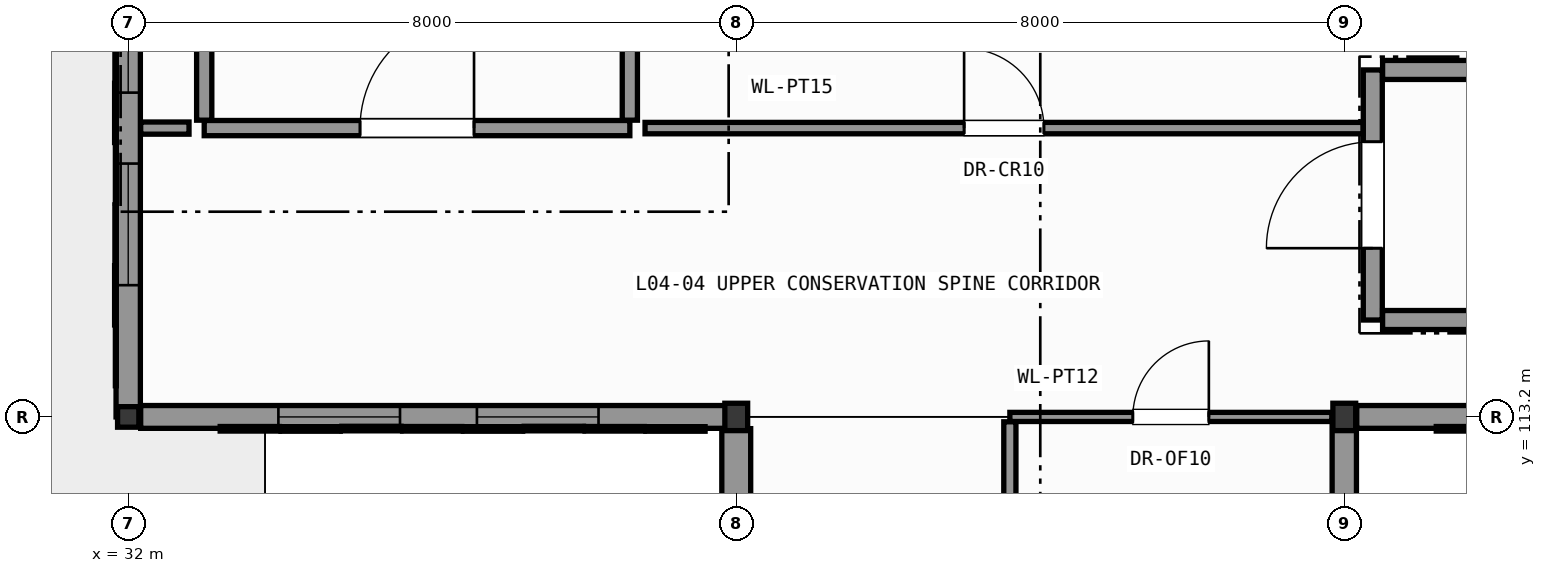
"""IFC4 building model, lengths in metres.
Left out: names, types, materials, properties, quantities, classifications, styles, units other than length and angle.
Written with IfcOpenShell. Run it as: python <this file> out.ifc"""

import sys

from ifc_helpers import new_model, si_unit, direction, frame, frame_2d, origin, origin_2d, place, context, subcontext, project, spatial, rectangle, i_section, extrude, element, fill, save


model = new_model("IFC4")
c1 = context("Model", 3, precision=1e-05, world=origin(), true_north=direction((0.0, 1.0)))
c2 = subcontext(c1, "Body", "Model", "MODEL_VIEW")
j1 = project(units=[si_unit("LENGTHUNIT", "METRE"), si_unit("PLANEANGLEUNIT", "RADIAN")], contexts=[c1])
p1 = place(None, origin())
s1 = spatial("IfcSite", under=j1, at=p1, CompositionType="ELEMENT")
p2 = place(p1, origin())
s2 = spatial("IfcBuilding", under=s1, at=p2, CompositionType="ELEMENT")
p3 = place(p2, frame((0.0, 0.0, 18.0)))
s3 = spatial("IfcBuildingStorey", under=s2, at=p3, CompositionType="ELEMENT", Elevation=18.0)
p4 = place(p3, frame((32.0, 113.2, 0.0), z_axis=(0.0, 0.0, 1.0), x_axis=(1.0, 0.0, 0.0)))
e1 = element("IfcColumn", 1, at=p4, inside=s3, PredefinedType="COLUMN", context=c2, shape_type="SweptSolid", body=[
    extrude(i_section(OverallWidth=0.28, OverallDepth=0.27, WebThickness=0.008, FlangeThickness=0.013, FilletRadius=0.024, at=origin_2d()), origin(), (0.0, 0.0, 1.0), 4.2),
])
for number, where, z_axis, x_axis in (
    (2, (40.0, 113.2, 0.0), (0.0, 0.0, 1.0), (1.0, 0.0, 0.0)),
    (3, (48.0, 113.2, 0.0), (0.0, 0.0, 1.0), (1.0, 0.0, 0.0)),
):
    element("IfcColumn", number, at=place(p3, frame(where, z_axis=z_axis, x_axis=x_axis)), inside=s3, PredefinedType="COLUMN", context=c2, shape_type="SweptSolid", body=[
        extrude(i_section(OverallWidth=0.3, OverallDepth=0.36, WebThickness=0.012, FlangeThickness=0.022, FilletRadius=0.027, at=origin_2d()), origin(), (0.0, 0.0, 1.0), 4.2),
    ])
p5 = place(p3, frame((48.0, 113.2, 0.0), z_axis=(0.0, 0.0, 1.0), x_axis=(0.0, -1.0, 0.0)))
e4 = element("IfcWall", 4, at=p5, inside=s3, PredefinedType="SOLIDWALL", context=c2, shape_type="SweptSolid", body=[
    extrude(rectangle(XDim=7.6, YDim=0.32, at=frame_2d((3.8, 0.0))), origin(), (0.0, 0.0, 1.0), 3.485),
])
p6 = place(p5, frame((1.958, 0.0, 0.95)))
e5 = element("IfcOpeningElement", 5, at=p6, cuts=e4, PredefinedType="OPENING", context=c2, shape_type="SweptSolid", body=[
    extrude(rectangle(XDim=1.15, YDim=1.9, at=frame_2d((0.575, 0.95))), frame((0.0, 0.17, 0.0), z_axis=(0.0, -1.0, 0.0), x_axis=(1.0, 0.0, 0.0)), (0.0, 0.0, 1.0), 0.34),
])
p7 = place(p5, frame((4.492, 0.0, 0.95)))
e6 = element("IfcOpeningElement", 6, at=p7, cuts=e4, PredefinedType="OPENING", context=c2, shape_type="SweptSolid", body=[
    extrude(rectangle(XDim=1.15, YDim=1.9, at=frame_2d((0.575, 0.95))), frame((0.0, 0.17, 0.0), z_axis=(0.0, -1.0, 0.0), x_axis=(1.0, 0.0, 0.0)), (0.0, 0.0, 1.0), 0.34),
])
p8 = place(p3, frame((56.0, 113.2, 0.0), z_axis=(0.0, 0.0, 1.0), x_axis=(-1.0, 0.0, 0.0)))
e7 = element("IfcWall", 7, at=p8, inside=s3, PredefinedType="SOLIDWALL", context=c2, shape_type="SweptSolid", body=[
    extrude(rectangle(XDim=7.836, YDim=0.3, at=frame_2d((3.918, 0.0))), origin(), (0.0, 0.0, 1.0), 3.625),
])
p9 = place(p8, frame((1.812, 0.0, 0.95)))
e8 = element("IfcOpeningElement", 8, at=p9, cuts=e7, PredefinedType="OPENING", context=c2, shape_type="SweptSolid", body=[
    extrude(rectangle(XDim=1.6, YDim=2.2, at=frame_2d((0.8, 1.1))), frame((0.0, 0.16, 0.0), z_axis=(0.0, -1.0, 0.0), x_axis=(1.0, 0.0, 0.0)), (0.0, 0.0, 1.0), 0.32),
])
p10 = place(p8, frame((4.424, 0.0, 0.95)))
e9 = element("IfcOpeningElement", 9, at=p10, cuts=e7, PredefinedType="OPENING", context=c2, shape_type="SweptSolid", body=[
    extrude(rectangle(XDim=1.6, YDim=2.2, at=frame_2d((0.8, 1.1))), frame((0.0, 0.16, 0.0), z_axis=(0.0, -1.0, 0.0), x_axis=(1.0, 0.0, 0.0)), (0.0, 0.0, 1.0), 0.32),
])
p11 = place(p3, frame((32.0, 113.2, 0.0), z_axis=(0.0, 0.0, 1.0), x_axis=(0.0, 1.0, 0.0)))
e10 = element("IfcWall", 10, at=p11, inside=s3, PredefinedType="SOLIDWALL", context=c2, shape_type="SweptSolid", body=[
    extrude(rectangle(XDim=7.6, YDim=0.32, at=frame_2d((3.8, 0.0))), origin(), (0.0, 0.0, 1.0), 3.485),
])
p12 = place(p11, frame((1.733, 0.0, 0.95)))
e11 = element("IfcOpeningElement", 11, at=p12, cuts=e10, PredefinedType="OPENING", context=c2, shape_type="SweptSolid", body=[
    extrude(rectangle(XDim=1.6, YDim=2.13, at=frame_2d((0.8, 1.065))), frame((0.0, 0.17, 0.0), z_axis=(0.0, -1.0, 0.0), x_axis=(1.0, 0.0, 0.0)), (0.0, 0.0, 1.0), 0.34),
])
p13 = place(p11, frame((4.267, 0.0, 0.95)))
e12 = element("IfcOpeningElement", 12, at=p13, cuts=e10, PredefinedType="OPENING", context=c2, shape_type="SweptSolid", body=[
    extrude(rectangle(XDim=1.6, YDim=2.13, at=frame_2d((0.8, 1.065))), frame((0.0, 0.17, 0.0), z_axis=(0.0, -1.0, 0.0), x_axis=(1.0, 0.0, 0.0)), (0.0, 0.0, 1.0), 0.34),
])
p14 = place(p3, frame((40.0, 113.2, 0.0), z_axis=(0.0, 0.0, 1.0), x_axis=(-1.0, 0.0, 0.0)))
e13 = element("IfcWall", 13, at=p14, inside=s3, PredefinedType="SOLIDWALL", context=c2, shape_type="SweptSolid", body=[
    extrude(rectangle(XDim=7.836, YDim=0.3, at=frame_2d((3.918, 0.0))), origin(), (0.0, 0.0, 1.0), 3.755),
])
p15 = place(p14, frame((1.812, 0.0, 0.95)))
e14 = element("IfcOpeningElement", 14, at=p15, cuts=e13, PredefinedType="OPENING", context=c2, shape_type="SweptSolid", body=[
    extrude(rectangle(XDim=1.6, YDim=2.2, at=frame_2d((0.8, 1.1))), frame((0.0, 0.16, 0.0), z_axis=(0.0, -1.0, 0.0), x_axis=(1.0, 0.0, 0.0)), (0.0, 0.0, 1.0), 0.32),
])
p16 = place(p14, frame((4.424, 0.0, 0.95)))
e15 = element("IfcOpeningElement", 15, at=p16, cuts=e13, PredefinedType="OPENING", context=c2, shape_type="SweptSolid", body=[
    extrude(rectangle(XDim=1.6, YDim=2.2, at=frame_2d((0.8, 1.1))), frame((0.0, 0.16, 0.0), z_axis=(0.0, -1.0, 0.0), x_axis=(1.0, 0.0, 0.0)), (0.0, 0.0, 1.0), 0.32),
])
p17 = place(p3, frame((40.0, 105.6, 0.0), z_axis=(0.0, 0.0, 1.0), x_axis=(0.0, 1.0, 0.0)))
e16 = element("IfcWall", 16, at=p17, inside=s3, PredefinedType="SOLIDWALL", context=c2, shape_type="SweptSolid", body=[
    extrude(rectangle(XDim=7.446, YDim=0.38, at=frame_2d((3.723, 0.0))), origin(), (0.0, 0.0, 1.0), 3.98),
])
p18 = place(p17, frame((1.632, 0.0, 0.95)))
e17 = element("IfcOpeningElement", 17, at=p18, cuts=e16, PredefinedType="OPENING", context=c2, shape_type="SweptSolid", body=[
    extrude(rectangle(XDim=1.7, YDim=2.63, at=frame_2d((0.85, 1.315))), frame((0.0, 0.2, 0.0), z_axis=(0.0, -1.0, 0.0), x_axis=(1.0, 0.0, 0.0)), (0.0, 0.0, 1.0), 0.4),
])
p19 = place(p17, frame((4.114, 0.0, 0.95)))
e18 = element("IfcOpeningElement", 18, at=p19, cuts=e16, PredefinedType="OPENING", context=c2, shape_type="SweptSolid", body=[
    extrude(rectangle(XDim=1.7, YDim=2.63, at=frame_2d((0.85, 1.315))), frame((0.0, 0.2, 0.0), z_axis=(0.0, -1.0, 0.0), x_axis=(1.0, 0.0, 0.0)), (0.0, 0.0, 1.0), 0.4),
])
p20 = place(p3, frame((48.375, 114.475, 0.0), z_axis=(0.0, 0.0, 1.0), x_axis=(0.0, 1.0, 0.0)))
e19 = element("IfcWall", 19, at=p20, inside=s3, PredefinedType="SHEAR", context=c2, shape_type="SweptSolid", body=[
    extrude(rectangle(XDim=3.29, YDim=0.25, at=frame_2d((1.645, 0.0))), origin(), (0.0, 0.0, 1.0), 3.98),
])
p21 = place(p20, frame((0.945, 0.0, 0.0)))
e20 = element("IfcOpeningElement", 20, at=p21, cuts=e19, PredefinedType="OPENING", context=c2, shape_type="SweptSolid", body=[
    extrude(rectangle(XDim=1.4, YDim=2.2, at=frame_2d((0.7, 1.1))), frame((0.0, 0.135, 0.0), z_axis=(0.0, -1.0, 0.0), x_axis=(1.0, 0.0, 0.0)), (0.0, 0.0, 1.0), 0.27),
])
for number, where, z_axis, x_axis in (
    (21, (48.504, 114.475, 0.0), (0.0, 0.0, 1.0), (1.0, 0.0, 0.0)),
    (22, (48.504, 117.765, 0.0), (0.0, 0.0, 1.0), (1.0, 0.0, 0.0)),
):
    element("IfcWall", number, at=place(p3, frame(where, z_axis=z_axis, x_axis=x_axis)), inside=s3, PredefinedType="SHEAR", context=c2, shape_type="SweptSolid", body=[
        extrude(rectangle(XDim=6.892, YDim=0.25, at=frame_2d((3.446, 0.0))), origin(), (0.0, 0.0, 1.0), 3.98),
    ])
p22 = place(p3, frame((33.0, 117.0, 0.0), z_axis=(0.0, 0.0, 1.0), x_axis=(1.0, 0.0, 0.0)))
e23 = element("IfcWall", 23, at=p22, inside=s3, PredefinedType="PARTITIONING", context=c2, shape_type="SweptSolid", body=[
    extrude(rectangle(XDim=5.6, YDim=0.2, at=frame_2d((2.8, 0.0))), origin(), (0.0, 0.0, 1.0), 3.98),
])
p23 = place(p22, frame((2.05, 0.0, 0.0)))
e24 = element("IfcOpeningElement", 24, at=p23, cuts=e23, PredefinedType="OPENING", context=c2, shape_type="SweptSolid", body=[
    extrude(rectangle(XDim=1.5, YDim=2.2, at=frame_2d((0.75, 1.1))), frame((0.0, 0.11, 0.0), z_axis=(0.0, -1.0, 0.0), x_axis=(1.0, 0.0, 0.0)), (0.0, 0.0, 1.0), 0.22),
])
for number, where, z_axis, x_axis in (
    (25, (33.0, 117.104, 0.0), (0.0, 0.0, 1.0), (0.0, 1.0, 0.0)),
    (26, (38.6, 117.104, 0.0), (0.0, 0.0, 1.0), (0.0, 1.0, 0.0)),
):
    element("IfcWall", number, at=place(p3, frame(where, z_axis=z_axis, x_axis=x_axis)), inside=s3, PredefinedType="PARTITIONING", context=c2, shape_type="SweptSolid", body=[
        extrude(rectangle(XDim=5.096, YDim=0.2, at=frame_2d((2.548, 0.0))), origin(), (0.0, 0.0, 1.0), 3.98),
    ])
p24 = place(p3, frame((32.164, 117.0, 0.0), z_axis=(0.0, 0.0, 1.0), x_axis=(1.0, 0.0, 0.0)))
e27 = element("IfcWall", 27, at=p24, inside=s3, PredefinedType="PARTITIONING", context=c2, shape_type="SweptSolid", body=[
    extrude(rectangle(XDim=0.636, YDim=0.16, at=frame_2d((0.318, 0.0))), origin(), (0.0, 0.0, 1.0), 3.98),
])
p25 = place(p3, frame((38.8, 117.0, 0.0), z_axis=(0.0, 0.0, 1.0), x_axis=(1.0, 0.0, 0.0)))
e28 = element("IfcWall", 28, at=p25, inside=s3, PredefinedType="PARTITIONING", context=c2, shape_type="SweptSolid", body=[
    extrude(rectangle(XDim=9.446, YDim=0.15, at=frame_2d((4.723, 0.0))), origin(), (0.0, 0.0, 1.0), 3.98),
])
p26 = place(p25, frame((4.198, 0.0, 0.0)))
e29 = element("IfcOpeningElement", 29, at=p26, cuts=e28, PredefinedType="OPENING", context=c2, shape_type="SweptSolid", body=[
    extrude(rectangle(XDim=1.05, YDim=2.2, at=frame_2d((0.525, 1.1))), frame((0.0, 0.085, 0.0), z_axis=(0.0, -1.0, 0.0), x_axis=(1.0, 0.0, 0.0)), (0.0, 0.0, 1.0), 0.17),
])
p27 = place(p3, frame((43.6, 113.2, 0.0), z_axis=(0.0, 0.0, 1.0), x_axis=(1.0, 0.0, 0.0)))
e30 = element("IfcWall", 30, at=p27, inside=s3, PredefinedType="PARTITIONING", context=c2, shape_type="SweptSolid", body=[
    extrude(rectangle(XDim=4.236, YDim=0.12, at=frame_2d((2.118, 0.0))), origin(), (0.0, 0.0, 1.0), 3.685),
])
p28 = place(p27, frame((1.618, 0.0, 0.0)))
e31 = element("IfcOpeningElement", 31, at=p28, cuts=e30, PredefinedType="OPENING", context=c2, shape_type="SweptSolid", body=[
    extrude(rectangle(XDim=1.0, YDim=2.15, at=frame_2d((0.5, 1.075))), frame((0.0, 0.07, 0.0), z_axis=(0.0, -1.0, 0.0), x_axis=(1.0, 0.0, 0.0)), (0.0, 0.0, 1.0), 0.14),
])
p29 = place(p3, frame((43.6, 83.4, 0.0), z_axis=(0.0, 0.0, 1.0), x_axis=(0.0, 1.0, 0.0)))
e32 = element("IfcWall", 32, at=p29, inside=s3, PredefinedType="PARTITIONING", context=c2, shape_type="SweptSolid", body=[
    extrude(rectangle(XDim=29.736, YDim=0.16, at=frame_2d((14.868, 0.0))), origin(), (0.0, 0.0, 1.0), 3.98),
])
p30 = place(p29, frame((14.393, 0.0, 0.0)))
e33 = element("IfcOpeningElement", 33, at=p30, cuts=e32, PredefinedType="OPENING", context=c2, shape_type="SweptSolid", body=[
    extrude(rectangle(XDim=0.95, YDim=2.1, at=frame_2d((0.475, 1.05))), frame((0.0, 0.09, 0.0), z_axis=(0.0, -1.0, 0.0), x_axis=(1.0, 0.0, 0.0)), (0.0, 0.0, 1.0), 0.18),
])
p31 = place(p12, origin())
e34 = element("IfcWindow", 34, at=p31, inside=s3, PartitioningType="SINGLE_PANEL", PredefinedType="WINDOW", context=c2, shape_type="SweptSolid", body=[
    extrude(rectangle(XDim=1.6, YDim=2.13, at=frame_2d((0.8, 1.065))), frame((0.0, 0.03, 0.0), z_axis=(0.0, -1.0, 0.0), x_axis=(1.0, 0.0, 0.0)), (0.0, 0.0, 1.0), 0.06),
])
fill(e11, e34)
p32 = place(p13, origin())
e35 = element("IfcWindow", 35, at=p32, inside=s3, PartitioningType="SINGLE_PANEL", PredefinedType="WINDOW", context=c2, shape_type="SweptSolid", body=[
    extrude(rectangle(XDim=1.6, YDim=2.13, at=frame_2d((0.8, 1.065))), frame((0.0, 0.03, 0.0), z_axis=(0.0, -1.0, 0.0), x_axis=(1.0, 0.0, 0.0)), (0.0, 0.0, 1.0), 0.06),
])
fill(e12, e35)
p33 = place(p15, origin())
e36 = element("IfcWindow", 36, at=p33, inside=s3, PartitioningType="SINGLE_PANEL", PredefinedType="WINDOW", context=c2, shape_type="SweptSolid", body=[
    extrude(rectangle(XDim=1.6, YDim=2.2, at=frame_2d((0.8, 1.1))), frame((0.0, 0.03, 0.0), z_axis=(0.0, -1.0, 0.0), x_axis=(1.0, 0.0, 0.0)), (0.0, 0.0, 1.0), 0.06),
])
fill(e14, e36)
p34 = place(p16, origin())
e37 = element("IfcWindow", 37, at=p34, inside=s3, PartitioningType="SINGLE_PANEL", PredefinedType="WINDOW", context=c2, shape_type="SweptSolid", body=[
    extrude(rectangle(XDim=1.6, YDim=2.2, at=frame_2d((0.8, 1.1))), frame((0.0, 0.03, 0.0), z_axis=(0.0, -1.0, 0.0), x_axis=(1.0, 0.0, 0.0)), (0.0, 0.0, 1.0), 0.06),
])
fill(e15, e37)
p35 = place(p21, origin())
e38 = element("IfcDoor", 38, at=p35, inside=s3, OperationType="SINGLE_SWING_LEFT", PredefinedType="DOOR", context=c2, shape_type="SweptSolid", body=[
    extrude(rectangle(XDim=1.4, YDim=2.2, at=frame_2d((0.7, 1.1))), frame((0.0, 0.025, 0.0), z_axis=(0.0, -1.0, 0.0), x_axis=(1.0, 0.0, 0.0)), (0.0, 0.0, 1.0), 0.05),
])
fill(e20, e38)
p36 = place(p23, origin())
e39 = element("IfcDoor", 39, at=p36, inside=s3, OperationType="SINGLE_SWING_RIGHT", PredefinedType="DOOR", context=c2, shape_type="SweptSolid", body=[
    extrude(rectangle(XDim=1.5, YDim=2.2, at=frame_2d((0.75, 1.1))), frame((0.0, 0.025, 0.0), z_axis=(0.0, -1.0, 0.0), x_axis=(1.0, 0.0, 0.0)), (0.0, 0.0, 1.0), 0.05),
])
fill(e24, e39)
p37 = place(p26, origin())
e40 = element("IfcDoor", 40, at=p37, inside=s3, OperationType="SINGLE_SWING_LEFT", PredefinedType="DOOR", context=c2, shape_type="SweptSolid", body=[
    extrude(rectangle(XDim=1.05, YDim=2.2, at=frame_2d((0.525, 1.1))), frame((0.0, 0.025, 0.0), z_axis=(0.0, -1.0, 0.0), x_axis=(1.0, 0.0, 0.0)), (0.0, 0.0, 1.0), 0.05),
])
fill(e29, e40)
p38 = place(p28, origin())
e41 = element("IfcDoor", 41, at=p38, inside=s3, OperationType="SINGLE_SWING_RIGHT", PredefinedType="DOOR", context=c2, shape_type="SweptSolid", body=[
    extrude(rectangle(XDim=1.0, YDim=2.15, at=frame_2d((0.5, 1.075))), frame((0.0, 0.025, 0.0), z_axis=(0.0, -1.0, 0.0), x_axis=(1.0, 0.0, 0.0)), (0.0, 0.0, 1.0), 0.05),
])
fill(e31, e41)
save(model, sys.argv[1])
